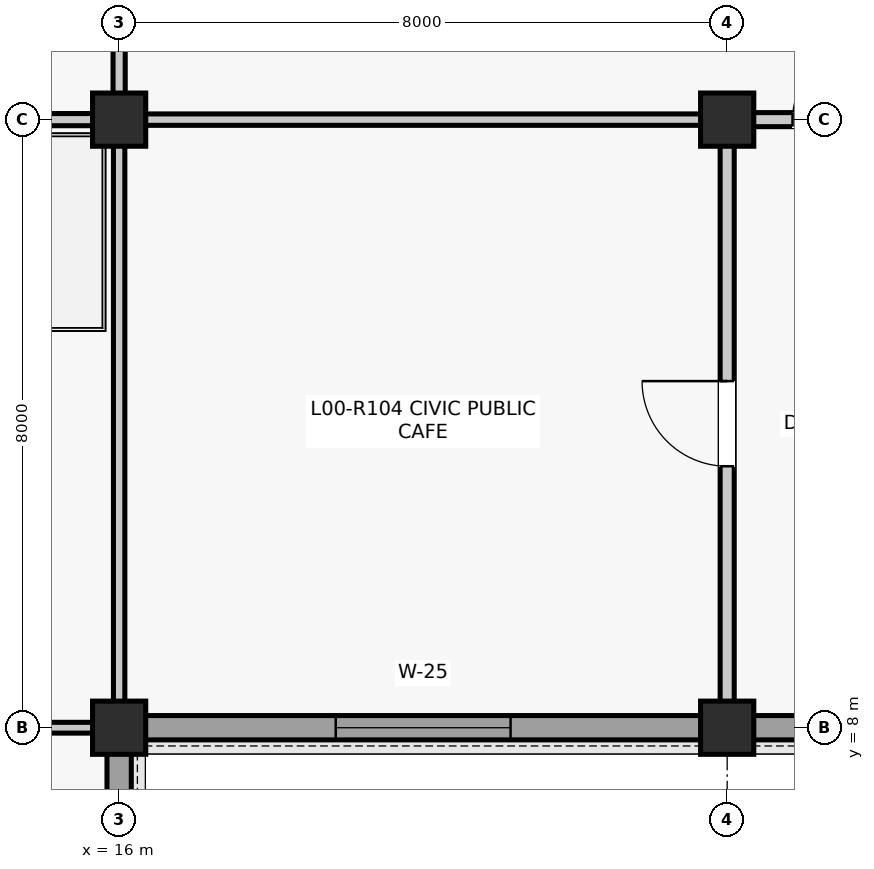
"""IFC4 building model, lengths in metres.
Left out: names, types, materials, properties, quantities, classifications, styles, units other than length and angle.
Written with IfcOpenShell. Run it as: python <this file> out.ifc"""

import sys

from ifc_helpers import new_model, si_unit, direction, frame, frame_2d, origin, origin_2d, place, context, subcontext, project, spatial, rectangle, extrude, element, fill, save


model = new_model("IFC4")
c1 = context("Model", 3, precision=1e-05, world=origin(), true_north=direction((0.0, 1.0)))
c2 = subcontext(c1, "Body", "Model", "MODEL_VIEW")
j1 = project(units=[si_unit("LENGTHUNIT", "METRE"), si_unit("PLANEANGLEUNIT", "RADIAN")], contexts=[c1])
p1 = place(None, origin())
s1 = spatial("IfcSite", under=j1, at=p1, CompositionType="ELEMENT")
p2 = place(p1, origin())
s2 = spatial("IfcBuilding", under=s1, at=p2, CompositionType="ELEMENT")
p3 = place(p2, origin())
s3 = spatial("IfcBuildingStorey", under=s2, at=p3, CompositionType="ELEMENT", Elevation=0.0)
for number, where, z_axis, x_axis in (
    (1, (16.0, 8.0, 0.0), (0.0, 0.0, 1.0), (1.0, 0.0, 0.0)),
    (2, (16.0, 16.0, 0.0), (0.0, 0.0, 1.0), (1.0, 0.0, 0.0)),
    (3, (24.0, 8.0, 0.0), (0.0, 0.0, 1.0), (1.0, 0.0, 0.0)),
    (4, (24.0, 16.0, 0.0), (0.0, 0.0, 1.0), (1.0, 0.0, 0.0)),
):
    element("IfcColumn", number, at=place(p3, frame(where, z_axis=z_axis, x_axis=x_axis)), inside=s3, PredefinedType="COLUMN", context=c2, shape_type="SweptSolid", body=[
        extrude(rectangle(XDim=0.7, YDim=0.7, at=origin_2d()), origin(), (0.0, 0.0, 1.0), 5.28),
    ])
p4 = place(p3, frame((16.0, 0.335, 0.0), z_axis=(0.0, 0.0, 1.0), x_axis=(0.0, 1.0, 0.0)))
e5 = element("IfcWall", 5, at=p4, inside=s3, PredefinedType="SOLIDWALL", context=c2, shape_type="SweptSolid", body=[
    extrude(rectangle(XDim=7.33, YDim=0.32, at=frame_2d((3.665, 0.0))), origin(), (0.0, 0.0, 1.0), 4.614),
])
p5 = place(p4, frame((2.59, 0.0, 0.9)))
e6 = element("IfcOpeningElement", 6, at=p5, cuts=e5, PredefinedType="OPENING", context=c2, shape_type="SweptSolid", body=[
    extrude(rectangle(XDim=2.15, YDim=2.8, at=frame_2d((1.075, 1.4))), frame((0.0, 0.17, 0.0), z_axis=(0.0, -1.0, 0.0), x_axis=(1.0, 0.0, 0.0)), (0.0, 0.0, 1.0), 0.34),
])
p6 = place(p3, frame((16.335, 8.0, 0.0), z_axis=(0.0, 0.0, 1.0), x_axis=(1.0, 0.0, 0.0)))
e7 = element("IfcWall", 7, at=p6, inside=s3, PredefinedType="SOLIDWALL", context=c2, shape_type="SweptSolid", body=[
    extrude(rectangle(XDim=7.33, YDim=0.32, at=frame_2d((3.665, 0.0))), origin(), (0.0, 0.0, 1.0), 4.677),
])
p7 = place(p6, frame((2.515, 0.0, 0.9)))
e8 = element("IfcOpeningElement", 8, at=p7, cuts=e7, PredefinedType="OPENING", context=c2, shape_type="SweptSolid", body=[
    extrude(rectangle(XDim=2.3, YDim=2.55, at=frame_2d((1.15, 1.275))), frame((0.0, 0.17, 0.0), z_axis=(0.0, -1.0, 0.0), x_axis=(1.0, 0.0, 0.0)), (0.0, 0.0, 1.0), 0.34),
])
p8 = place(p3, frame((24.335, 8.0, 0.0), z_axis=(0.0, 0.0, 1.0), x_axis=(1.0, 0.0, 0.0)))
e9 = element("IfcWall", 9, at=p8, inside=s3, PredefinedType="SOLIDWALL", context=c2, shape_type="SweptSolid", body=[
    extrude(rectangle(XDim=7.33, YDim=0.32, at=frame_2d((3.665, 0.0))), origin(), (0.0, 0.0, 1.0), 4.61),
])
p9 = place(p8, frame((0.719, 0.0, 0.95)))
e10 = element("IfcOpeningElement", 10, at=p9, cuts=e9, PredefinedType="OPENING", context=c2, shape_type="SweptSolid", body=[
    extrude(rectangle(XDim=1.2, YDim=1.8, at=frame_2d((0.6, 0.9))), frame((0.0, 0.17, 0.0), z_axis=(0.0, -1.0, 0.0), x_axis=(1.0, 0.0, 0.0)), (0.0, 0.0, 1.0), 0.34),
])
p10 = place(p8, frame((5.411, 0.0, 0.95)))
e11 = element("IfcOpeningElement", 11, at=p10, cuts=e9, PredefinedType="OPENING", context=c2, shape_type="SweptSolid", body=[
    extrude(rectangle(XDim=1.2, YDim=1.8, at=frame_2d((0.6, 0.9))), frame((0.0, 0.17, 0.0), z_axis=(0.0, -1.0, 0.0), x_axis=(1.0, 0.0, 0.0)), (0.0, 0.0, 1.0), 0.34),
])
p11 = place(p3, frame((8.34, 8.0, 0.0), z_axis=(0.0, 0.0, 1.0), x_axis=(1.0, 0.0, 0.0)))
e12 = element("IfcWall", 12, at=p11, inside=s3, PredefinedType="PARTITIONING", context=c2, shape_type="SweptSolid", body=[
    extrude(rectangle(XDim=7.32, YDim=0.142, at=frame_2d((3.66, 0.0))), origin(), (0.0, 0.0, 1.0), 4.336),
])
p12 = place(p3, frame((16.0, 8.34, 0.0), z_axis=(0.0, 0.0, 1.0), x_axis=(0.0, 1.0, 0.0)))
e13 = element("IfcWall", 13, at=p12, inside=s3, PredefinedType="PARTITIONING", context=c2, shape_type="SweptSolid", body=[
    extrude(rectangle(XDim=7.32, YDim=0.15, at=frame_2d((3.66, 0.0))), origin(), (0.0, 0.0, 1.0), 4.471),
])
p13 = place(p3, frame((8.39, 16.0, 0.0), z_axis=(0.0, 0.0, 1.0), x_axis=(1.0, 0.0, 0.0)))
e14 = element("IfcWall", 14, at=p13, inside=s3, PredefinedType="PARTITIONING", context=c2, shape_type="SweptSolid", body=[
    extrude(rectangle(XDim=7.27, YDim=0.16, at=frame_2d((3.635, 0.0))), origin(), (0.0, 0.0, 1.0), 4.404),
])
p14 = place(p3, frame((16.0, 16.34, 0.0), z_axis=(0.0, 0.0, 1.0), x_axis=(0.0, 1.0, 0.0)))
e15 = element("IfcWall", 15, at=p14, inside=s3, PredefinedType="PARTITIONING", context=c2, shape_type="SweptSolid", body=[
    extrude(rectangle(XDim=7.32, YDim=0.16, at=frame_2d((3.66, 0.0))), origin(), (0.0, 0.0, 1.0), 4.603),
])
p15 = place(p3, frame((24.0, 8.34, 0.0), z_axis=(0.0, 0.0, 1.0), x_axis=(0.0, 1.0, 0.0)))
e16 = element("IfcWall", 16, at=p15, inside=s3, PredefinedType="PARTITIONING", context=c2, shape_type="SweptSolid", body=[
    extrude(rectangle(XDim=7.32, YDim=0.185, at=frame_2d((3.66, 0.0))), origin(), (0.0, 0.0, 1.0), 4.403),
])
p16 = place(p15, frame((3.1, 0.0, 0.0)))
e17 = element("IfcOpeningElement", 17, at=p16, cuts=e16, PredefinedType="OPENING", context=c2, shape_type="SweptSolid", body=[
    extrude(rectangle(XDim=1.12, YDim=2.22, at=frame_2d((0.56, 1.11))), frame((0.0, 0.103, 0.0), z_axis=(0.0, -1.0, 0.0), x_axis=(1.0, 0.0, 0.0)), (0.0, 0.0, 1.0), 0.205),
])
p17 = place(p3, frame((16.34, 16.0, 0.0), z_axis=(0.0, 0.0, 1.0), x_axis=(1.0, 0.0, 0.0)))
e18 = element("IfcWall", 18, at=p17, inside=s3, PredefinedType="PARTITIONING", context=c2, shape_type="SweptSolid", body=[
    extrude(rectangle(XDim=7.32, YDim=0.15, at=frame_2d((3.66, 0.0))), origin(), (0.0, 0.0, 1.0), 4.603),
])
p18 = place(p3, frame((24.34, 16.0, 0.0), z_axis=(0.0, 0.0, 1.0), x_axis=(1.0, 0.0, 0.0)))
e19 = element("IfcWall", 19, at=p18, inside=s3, PredefinedType="PARTITIONING", context=c2, shape_type="SweptSolid", body=[
    extrude(rectangle(XDim=7.32, YDim=0.185, at=frame_2d((3.66, 0.0))), origin(), (0.0, 0.0, 1.0), 4.667),
])
p19 = place(p18, frame((0.52, 0.0, 0.0)))
e20 = element("IfcOpeningElement", 20, at=p19, cuts=e19, PredefinedType="OPENING", context=c2, shape_type="SweptSolid", body=[
    extrude(rectangle(XDim=0.94, YDim=2.12, at=frame_2d((0.47, 1.06))), frame((0.0, 0.103, 0.0), z_axis=(0.0, -1.0, 0.0), x_axis=(1.0, 0.0, 0.0)), (0.0, 0.0, 1.0), 0.205),
])
p20 = place(p7, origin())
e21 = element("IfcWindow", 21, at=p20, inside=s3, PartitioningType="SINGLE_PANEL", PredefinedType="WINDOW", context=c2, shape_type="SweptSolid", body=[
    extrude(rectangle(XDim=2.3, YDim=2.55, at=frame_2d((1.15, 1.275))), frame((0.0, 0.03, 0.0), z_axis=(0.0, -1.0, 0.0), x_axis=(1.0, 0.0, 0.0)), (0.0, 0.0, 1.0), 0.06),
])
fill(e8, e21)
p21 = place(p16, origin())
e22 = element("IfcDoor", 22, at=p21, inside=s3, OperationType="SINGLE_SWING_RIGHT", PredefinedType="DOOR", context=c2, shape_type="SweptSolid", body=[
    extrude(rectangle(XDim=1.12, YDim=2.22, at=frame_2d((0.56, 1.11))), frame((0.0, 0.025, 0.0), z_axis=(0.0, -1.0, 0.0), x_axis=(1.0, 0.0, 0.0)), (0.0, 0.0, 1.0), 0.05),
])
fill(e17, e22)
p22 = place(p19, origin())
e23 = element("IfcDoor", 23, at=p22, inside=s3, OperationType="SINGLE_SWING_RIGHT", PredefinedType="DOOR", context=c2, shape_type="SweptSolid", body=[
    extrude(rectangle(XDim=0.94, YDim=2.12, at=frame_2d((0.47, 1.06))), frame((0.0, 0.025, 0.0), z_axis=(0.0, -1.0, 0.0), x_axis=(1.0, 0.0, 0.0)), (0.0, 0.0, 1.0), 0.05),
])
fill(e20, e23)
save(model, sys.argv[1])
